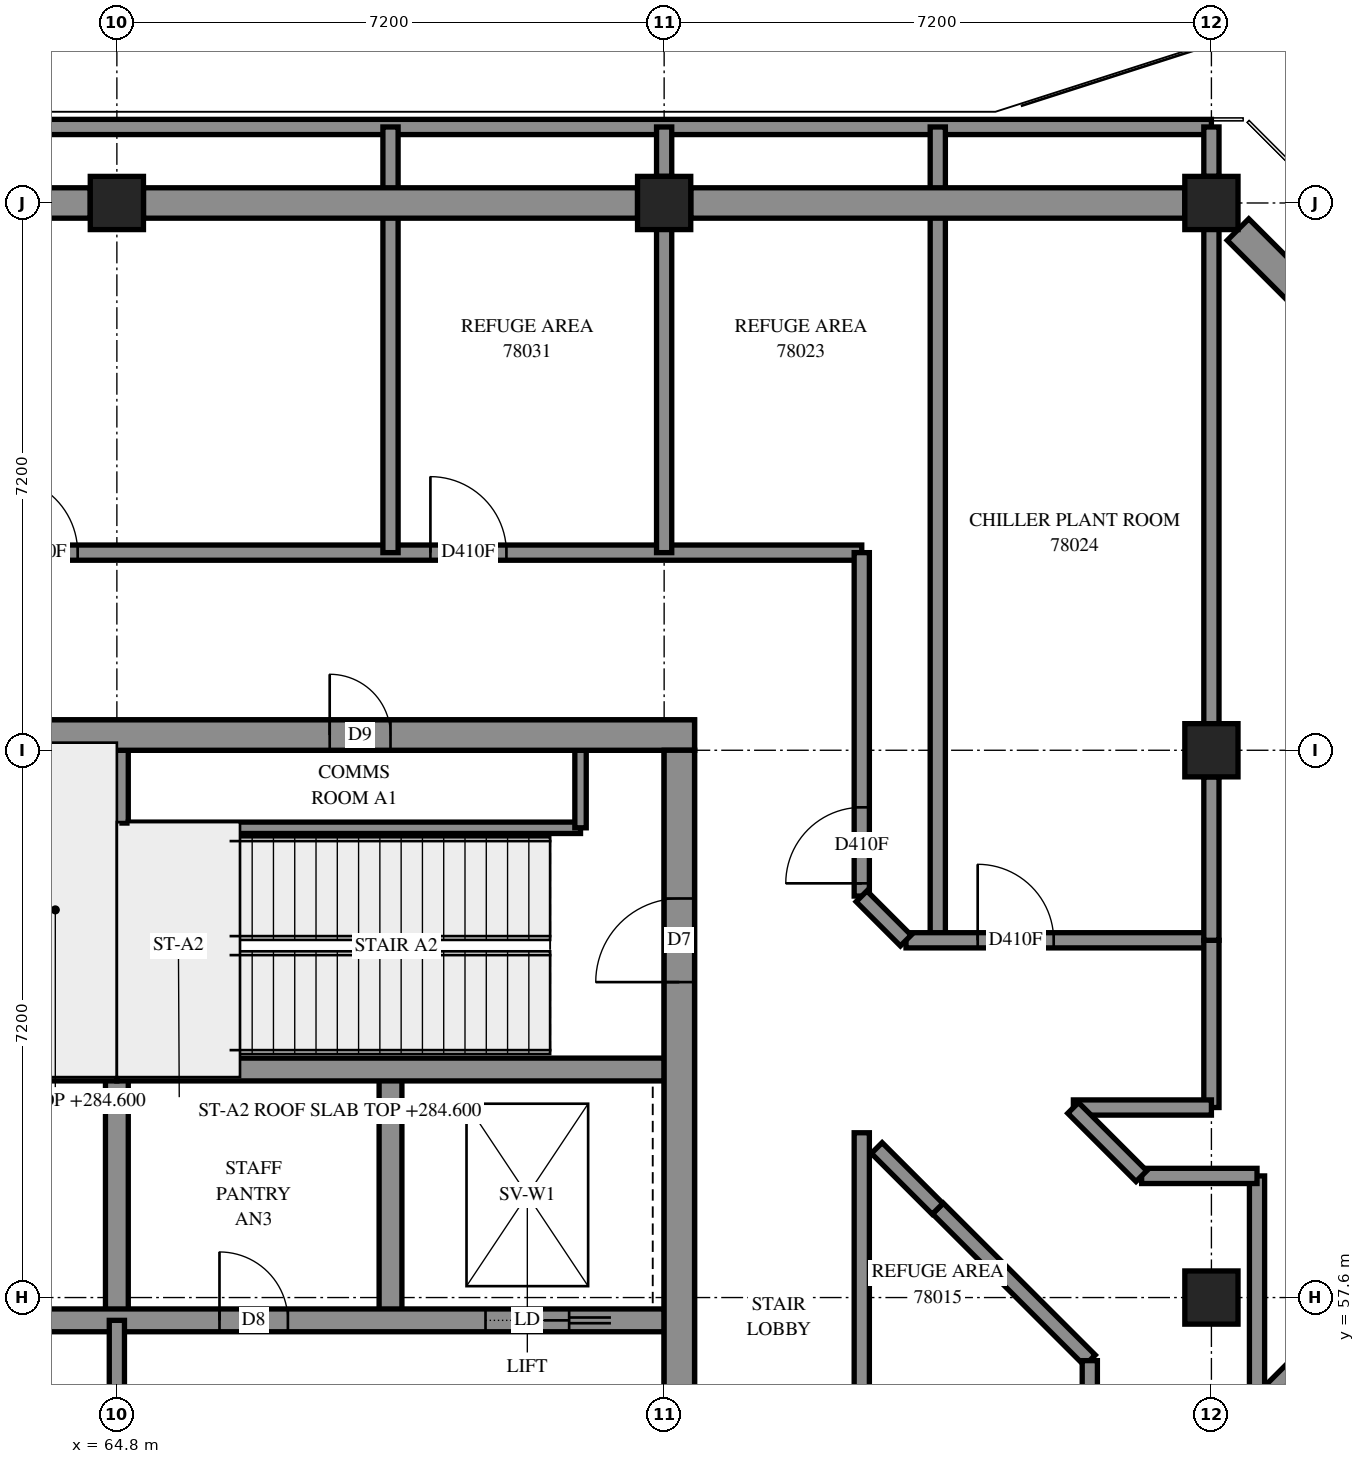
"""IFC4 building model, lengths in metres.
Left out: names, types, materials, properties, quantities, classifications, styles, units other than length and angle.
Written with IfcOpenShell. Run it as: python <this file> out.ifc"""

import sys

from ifc_helpers import new_model, si_unit, direction, frame, frame_2d, origin, origin_2d, place, context, subcontext, project, spatial, rectangle, extrude, element, fill, save


model = new_model("IFC4")
c1 = context("Model", 3, precision=1e-05, world=origin(), true_north=direction((0.0, 1.0)))
c2 = subcontext(c1, "Body", "Model", "MODEL_VIEW")
j1 = project(units=[si_unit("LENGTHUNIT", "METRE"), si_unit("PLANEANGLEUNIT", "RADIAN")], contexts=[c1])
p1 = place(None, origin())
s1 = spatial("IfcSite", under=j1, at=p1, CompositionType="ELEMENT")
p2 = place(p1, origin())
s2 = spatial("IfcBuilding", under=s1, at=p2, CompositionType="ELEMENT")
p3 = place(p2, frame((0.0, 0.0, 284.6)))
s3 = spatial("IfcBuildingStorey", under=s2, at=p3, CompositionType="ELEMENT", Elevation=284.6)
for number, where, z_axis, x_axis in (
    (1, (64.8, 72.0, 0.0), (0.0, 0.0, 1.0), (1.0, 0.0, 0.0)),
    (2, (72.0, 72.0, 0.0), (0.0, 0.0, 1.0), (1.0, 0.0, 0.0)),
    (3, (79.2, 57.6, 0.0), (0.0, 0.0, 1.0), (1.0, 0.0, 0.0)),
    (4, (79.2, 64.8, 0.0), (0.0, 0.0, 1.0), (1.0, 0.0, 0.0)),
    (5, (79.2, 72.0, 0.0), (0.0, 0.0, 1.0), (1.0, 0.0, 0.0)),
):
    element("IfcColumn", number, at=place(p3, frame(where, z_axis=z_axis, x_axis=x_axis)), inside=s3, PredefinedType="COLUMN", context=c2, shape_type="SweptSolid", body=[
        extrude(rectangle(XDim=0.7, YDim=0.7, at=origin_2d()), origin(), (0.0, 0.0, 1.0), 5.7),
    ])
p4 = place(p3, frame((57.2, 65.0, -0.3), z_axis=(0.0, 0.0, 1.0), x_axis=(1.0, 0.0, 0.0)))
e6 = element("IfcWall", 6, at=p4, inside=s3, PredefinedType="SHEAR", context=c2, shape_type="SweptSolid", body=[
    extrude(rectangle(XDim=15.2, YDim=0.4, at=frame_2d((7.6, 0.0))), origin(), (0.0, 0.0, 1.0), 5.3),
])
p5 = place(p4, frame((10.4, 0.0, 0.3)))
e7 = element("IfcOpeningElement", 7, at=p5, cuts=e6, PredefinedType="OPENING", context=c2, shape_type="SweptSolid", body=[
    extrude(rectangle(XDim=0.8, YDim=2.1, at=frame_2d((0.4, 1.05))), frame((0.0, 0.21, 0.0), z_axis=(0.0, -1.0, 0.0), x_axis=(1.0, 0.0, 0.0)), (0.0, 0.0, 1.0), 0.42),
])
p6 = place(p3, frame((72.2, 50.4, -0.3), z_axis=(0.0, 0.0, 1.0), x_axis=(0.0, 1.0, 0.0)))
e8 = element("IfcWall", 8, at=p6, inside=s3, PredefinedType="SHEAR", context=c2, shape_type="SweptSolid", body=[
    extrude(rectangle(XDim=14.4, YDim=0.4, at=frame_2d((7.2, 0.0))), origin(), (0.0, 0.0, 1.0), 5.3),
])
p7 = place(p6, frame((4.55, 0.0, 0.3)))
e9 = element("IfcOpeningElement", 9, at=p7, cuts=e8, PredefinedType="OPENING", context=c2, shape_type="SweptSolid", body=[
    extrude(rectangle(XDim=1.1, YDim=2.1, at=frame_2d((0.55, 1.05))), frame((0.0, 0.21, 0.0), z_axis=(0.0, -1.0, 0.0), x_axis=(1.0, 0.0, 0.0)), (0.0, 0.0, 1.0), 0.42),
])
p8 = place(p6, frame((11.35, 0.0, 0.3)))
e10 = element("IfcOpeningElement", 10, at=p8, cuts=e8, PredefinedType="OPENING", context=c2, shape_type="SweptSolid", body=[
    extrude(rectangle(XDim=1.1, YDim=2.1, at=frame_2d((0.55, 1.05))), frame((0.0, 0.21, 0.0), z_axis=(0.0, -1.0, 0.0), x_axis=(1.0, 0.0, 0.0)), (0.0, 0.0, 1.0), 0.42),
])
for number, where, z_axis, x_axis in (
    (11, (64.8, 57.3, 0.0), (0.0, 0.0, 1.0), (0.0, 1.0, 0.0)),
    (12, (68.4, 57.3, 0.0), (0.0, 0.0, 1.0), (0.0, 1.0, 0.0)),
):
    element("IfcWall", number, at=place(p3, frame(where, z_axis=z_axis, x_axis=x_axis)), inside=s3, PredefinedType="SOLIDWALL", context=c2, shape_type="SweptSolid", body=[
        extrude(rectangle(XDim=3.3, YDim=0.3, at=frame_2d((1.65, 0.0))), origin(), (0.0, 0.0, 1.0), 5.7),
    ])
p9 = place(p3, frame((57.6, 57.3, 0.0), z_axis=(0.0, 0.0, 1.0), x_axis=(1.0, 0.0, 0.0)))
e13 = element("IfcWall", 13, at=p9, inside=s3, PredefinedType="SOLIDWALL", context=c2, shape_type="SweptSolid", body=[
    extrude(rectangle(XDim=14.4, YDim=0.3, at=frame_2d((7.2, 0.0))), origin(), (0.0, 0.0, 1.0), 5.7),
])
p10 = place(p9, frame((8.55, 0.0, 0.0)))
e14 = element("IfcOpeningElement", 14, at=p10, cuts=e13, PredefinedType="OPENING", context=c2, shape_type="SweptSolid", body=[
    extrude(rectangle(XDim=0.9, YDim=2.1, at=frame_2d((0.45, 1.05))), frame((0.0, 0.16, 0.0), z_axis=(0.0, -1.0, 0.0), x_axis=(1.0, 0.0, 0.0)), (0.0, 0.0, 1.0), 0.32),
])
p11 = place(p9, frame((12.05, 0.0, 0.0)))
e15 = element("IfcOpeningElement", 15, at=p11, cuts=e13, PredefinedType="OPENING", context=c2, shape_type="SweptSolid", body=[
    extrude(rectangle(XDim=1.1, YDim=2.1, at=frame_2d((0.55, 1.05))), frame((0.0, 0.16, 0.0), z_axis=(0.0, -1.0, 0.0), x_axis=(1.0, 0.0, 0.0)), (0.0, 0.0, 1.0), 0.32),
])
for number, where, z_axis, x_axis in (
    (16, (57.6, 60.6, 0.0), (0.0, 0.0, 1.0), (1.0, 0.0, 0.0)),
    (17, (64.8, 60.6, 0.0), (0.0, 0.0, 1.0), (1.0, 0.0, 0.0)),
):
    element("IfcWall", number, at=place(p3, frame(where, z_axis=z_axis, x_axis=x_axis)), inside=s3, PredefinedType="SOLIDWALL", context=c2, shape_type="SweptSolid", body=[
        extrude(rectangle(XDim=7.2, YDim=0.3, at=frame_2d((3.6, 0.0))), origin(), (0.0, 0.0, 1.0), 5.7),
    ])
p12 = place(p3, frame((64.8, 60.6, 0.0), z_axis=(0.0, 0.0, 1.0), x_axis=(0.0, 1.0, 0.0)))
e18 = element("IfcWall", 18, at=p12, inside=s3, PredefinedType="SOLIDWALL", context=c2, shape_type="SweptSolid", body=[
    extrude(rectangle(XDim=4.2, YDim=0.3, at=frame_2d((2.1, 0.0))), origin(), (0.0, 0.0, 1.0), 5.7),
])
p13 = place(p3, frame((76.513, 49.231, -0.3), z_axis=(0.0, 0.0, 1.0), x_axis=(0.7071067812, 0.7071067812, 0.0)))
e19 = element("IfcWall", 19, at=p13, inside=s3, PredefinedType="SHEAR", context=c2, shape_type="SweptSolid", body=[
    extrude(rectangle(XDim=14.4, YDim=0.4, at=frame_2d((7.2, 0.0))), origin(), (0.0, 0.0, 1.0), 5.3),
])
p14 = place(p13, frame((4.55, 0.0, 0.3)))
e20 = element("IfcOpeningElement", 20, at=p14, cuts=e19, PredefinedType="OPENING", context=c2, shape_type="SweptSolid", body=[
    extrude(rectangle(XDim=1.1, YDim=2.1, at=frame_2d((0.55, 1.05))), frame((0.0, 0.21, 0.0), z_axis=(0.0, -1.0, 0.0), x_axis=(1.0, 0.0, 0.0)), (0.0, 0.0, 1.0), 0.42),
])
p15 = place(p13, frame((11.35, 0.0, 0.3)))
e21 = element("IfcOpeningElement", 21, at=p15, cuts=e19, PredefinedType="OPENING", context=c2, shape_type="SweptSolid", body=[
    extrude(rectangle(XDim=1.1, YDim=2.1, at=frame_2d((0.55, 1.05))), frame((0.0, 0.21, 0.0), z_axis=(0.0, -1.0, 0.0), x_axis=(1.0, 0.0, 0.0)), (0.0, 0.0, 1.0), 0.42),
])
p16 = place(p3, frame((64.95, 63.78, 0.0), z_axis=(0.0, 0.0, 1.0), x_axis=(1.0, 0.0, 0.0)))
e22 = element("IfcWall", 22, at=p16, inside=s3, PredefinedType="PARTITIONING", context=c2, shape_type="SweptSolid", body=[
    extrude(rectangle(XDim=5.95, YDim=0.15, at=frame_2d((2.975, 0.0))), origin(), (0.0, 0.0, 1.0), 5.7),
])
p17 = place(p3, frame((70.9, 63.78, 0.0), z_axis=(0.0, 0.0, 1.0), x_axis=(0.0, 1.0, 0.0)))
e23 = element("IfcWall", 23, at=p17, inside=s3, PredefinedType="PARTITIONING", context=c2, shape_type="SweptSolid", body=[
    extrude(rectangle(XDim=1.02, YDim=0.15, at=frame_2d((0.51, 0.0))), origin(), (0.0, 0.0, 1.0), 5.7),
])
p18 = place(p3, frame((64.8, 53.7, 0.0), z_axis=(0.0, 0.0, 1.0), x_axis=(0.0, 1.0, 0.0)))
e24 = element("IfcWall", 24, at=p18, inside=s3, PredefinedType="PARTITIONING", context=c2, shape_type="SweptSolid", body=[
    extrude(rectangle(XDim=3.6, YDim=0.2, at=frame_2d((1.8, 0.0))), origin(), (0.0, 0.0, 1.0), 5.7),
])
p19 = place(p18, frame((1.25, 0.0, 0.0)))
e25 = element("IfcOpeningElement", 25, at=p19, cuts=e24, PredefinedType="OPENING", context=c2, shape_type="SweptSolid", body=[
    extrude(rectangle(XDim=1.1, YDim=2.1, at=frame_2d((0.55, 1.05))), frame((0.0, 0.11, 0.0), z_axis=(0.0, -1.0, 0.0), x_axis=(1.0, 0.0, 0.0)), (0.0, 0.0, 1.0), 0.22),
])
p20 = place(p3, frame((27.73, 73.0, 0.0), z_axis=(0.0, 0.0, 1.0), x_axis=(1.0, 0.0, 0.0)))
e26 = element("IfcWall", 26, at=p20, inside=s3, PredefinedType="PARTITIONING", context=c2, shape_type="SweptSolid", body=[
    extrude(rectangle(XDim=51.47, YDim=0.2, at=frame_2d((25.735, 0.0))), origin(), (0.0, 0.0, 1.0), 5.2),
])
p21 = place(p3, frame((55.002, 67.4, 0.0), z_axis=(0.0, 0.0, 1.0), x_axis=(1.0, 0.0, 0.0)))
e27 = element("IfcWall", 27, at=p21, inside=s3, PredefinedType="PARTITIONING", context=c2, shape_type="SweptSolid", body=[
    extrude(rectangle(XDim=19.598, YDim=0.2, at=frame_2d((9.799, 0.0))), origin(), (0.0, 0.0, 1.0), 5.7),
])
p22 = place(p21, frame((8.282, 0.0, 0.0)))
e28 = element("IfcOpeningElement", 28, at=p22, cuts=e27, PredefinedType="OPENING", context=c2, shape_type="SweptSolid", body=[
    extrude(rectangle(XDim=1.0, YDim=2.1, at=frame_2d((0.5, 1.05))), frame((0.0, 0.11, 0.0), z_axis=(0.0, -1.0, 0.0), x_axis=(1.0, 0.0, 0.0)), (0.0, 0.0, 1.0), 0.22),
])
p23 = place(p21, frame((13.923, 0.0, 0.0)))
e29 = element("IfcOpeningElement", 29, at=p23, cuts=e27, PredefinedType="OPENING", context=c2, shape_type="SweptSolid", body=[
    extrude(rectangle(XDim=1.0, YDim=2.1, at=frame_2d((0.5, 1.05))), frame((0.0, 0.11, 0.0), z_axis=(0.0, -1.0, 0.0), x_axis=(1.0, 0.0, 0.0)), (0.0, 0.0, 1.0), 0.22),
])
p24 = place(p3, frame((75.6, 62.3, 0.0), z_axis=(0.0, 0.0, 1.0), x_axis=(0.0, 1.0, 0.0)))
e30 = element("IfcWall", 30, at=p24, inside=s3, PredefinedType="PARTITIONING", context=c2, shape_type="SweptSolid", body=[
    extrude(rectangle(XDim=10.7, YDim=0.2, at=frame_2d((5.35, 0.0))), origin(), (0.0, 0.0, 1.0), 5.7),
])
p25 = place(p3, frame((79.2, 64.45, 0.0), z_axis=(0.0, 0.0, 1.0), x_axis=(0.0, 1.0, 0.0)))
e31 = element("IfcWall", 31, at=p25, inside=s3, PredefinedType="PARTITIONING", context=c2, shape_type="SweptSolid", body=[
    extrude(rectangle(XDim=7.9, YDim=0.2, at=frame_2d((3.95, 0.0))), origin(), (0.0, 0.0, 1.0), 5.7),
])
p26 = place(p3, frame((68.4, 67.4, 0.0), z_axis=(0.0, 0.0, 1.0), x_axis=(0.0, 1.0, 0.0)))
e32 = element("IfcWall", 32, at=p26, inside=s3, PredefinedType="PARTITIONING", context=c2, shape_type="SweptSolid", body=[
    extrude(rectangle(XDim=5.6, YDim=0.2, at=frame_2d((2.8, 0.0))), origin(), (0.0, 0.0, 1.0), 5.7),
])
p27 = place(p3, frame((74.6, 55.102, 0.0), z_axis=(0.0, 0.0, 1.0), x_axis=(0.0, 1.0, 0.0)))
e33 = element("IfcWall", 33, at=p27, inside=s3, PredefinedType="PARTITIONING", context=c2, shape_type="SweptSolid", body=[
    extrude(rectangle(XDim=4.666, YDim=0.2, at=frame_2d((2.333, 0.0))), origin(), (0.0, 0.0, 1.0), 5.7),
])
p28 = place(p3, frame((74.6, 62.882, 0.0), z_axis=(0.0, 0.0, 1.0), x_axis=(0.0, 1.0, 0.0)))
e34 = element("IfcWall", 34, at=p28, inside=s3, PredefinedType="PARTITIONING", context=c2, shape_type="SweptSolid", body=[
    extrude(rectangle(XDim=4.518, YDim=0.2, at=frame_2d((2.259, 0.0))), origin(), (0.0, 0.0, 1.0), 5.7),
])
p29 = place(p28, frame((0.167, 0.0, 0.0)))
e35 = element("IfcOpeningElement", 35, at=p29, cuts=e34, PredefinedType="OPENING", context=c2, shape_type="SweptSolid", body=[
    extrude(rectangle(XDim=1.0, YDim=2.1, at=frame_2d((0.5, 1.05))), frame((0.0, 0.11, 0.0), z_axis=(0.0, -1.0, 0.0), x_axis=(1.0, 0.0, 0.0)), (0.0, 0.0, 1.0), 0.22),
])
p30 = place(p3, frame((72.0, 67.4, 0.0), z_axis=(0.0, 0.0, 1.0), x_axis=(0.0, 1.0, 0.0)))
e36 = element("IfcWall", 36, at=p30, inside=s3, PredefinedType="PARTITIONING", context=c2, shape_type="SweptSolid", body=[
    extrude(rectangle(XDim=4.95, YDim=0.2, at=frame_2d((2.475, 0.0))), origin(), (0.0, 0.0, 1.0), 5.7),
])
p31 = place(p3, frame((75.182, 62.3, 0.0), z_axis=(0.0, 0.0, 1.0), x_axis=(1.0, 0.0, 0.0)))
e37 = element("IfcWall", 37, at=p31, inside=s3, PredefinedType="PARTITIONING", context=c2, shape_type="SweptSolid", body=[
    extrude(rectangle(XDim=4.018, YDim=0.2, at=frame_2d((2.009, 0.0))), origin(), (0.0, 0.0, 1.0), 5.7),
])
p32 = place(p31, frame((0.943, 0.0, 0.0)))
e38 = element("IfcOpeningElement", 38, at=p32, cuts=e37, PredefinedType="OPENING", context=c2, shape_type="SweptSolid", body=[
    extrude(rectangle(XDim=1.0, YDim=2.1, at=frame_2d((0.5, 1.05))), frame((0.0, 0.11, 0.0), z_axis=(0.0, -1.0, 0.0), x_axis=(1.0, 0.0, 0.0)), (0.0, 0.0, 1.0), 0.22),
])
p33 = place(p3, frame((79.8, 56.198, 0.0), z_axis=(0.0, 0.0, 1.0), x_axis=(0.0, 1.0, 0.0)))
e39 = element("IfcWall", 39, at=p33, inside=s3, PredefinedType="PARTITIONING", context=c2, shape_type="SweptSolid", body=[
    extrude(rectangle(XDim=3.002, YDim=0.2, at=frame_2d((1.501, 0.0))), origin(), (0.0, 0.0, 1.0), 5.7),
])
p34 = place(p3, frame((75.601, 58.771, 0.0), z_axis=(0.0, 0.0, 1.0), x_axis=(0.7074604229, -0.7067529625, 0.0)))
e40 = element("IfcWall", 40, at=p34, inside=s3, PredefinedType="PARTITIONING", context=c2, shape_type="SweptSolid", body=[
    extrude(rectangle(XDim=2.827, YDim=0.2, at=frame_2d((1.413, 0.0))), origin(), (0.0, 0.0, 1.0), 5.7),
])
p35 = place(p3, frame((79.2, 60.1, 0.0), z_axis=(0.0, 0.0, 1.0), x_axis=(0.0, 1.0, 0.0)))
e41 = element("IfcWall", 41, at=p35, inside=s3, PredefinedType="PARTITIONING", context=c2, shape_type="SweptSolid", body=[
    extrude(rectangle(XDim=2.2, YDim=0.2, at=frame_2d((1.1, 0.0))), origin(), (0.0, 0.0, 1.0), 5.7),
])
p36 = place(p3, frame((79.2, 62.3, 0.0), z_axis=(0.0, 0.0, 1.0), x_axis=(0.0, 1.0, 0.0)))
e42 = element("IfcWall", 42, at=p36, inside=s3, PredefinedType="PARTITIONING", context=c2, shape_type="SweptSolid", body=[
    extrude(rectangle(XDim=2.15, YDim=0.2, at=frame_2d((1.075, 0.0))), origin(), (0.0, 0.0, 1.0), 5.7),
])
p37 = place(p3, frame((77.384, 60.1, 0.0), z_axis=(0.0, 0.0, 1.0), x_axis=(1.0, 0.0, 0.0)))
e43 = element("IfcWall", 43, at=p37, inside=s3, PredefinedType="PARTITIONING", context=c2, shape_type="SweptSolid", body=[
    extrude(rectangle(XDim=1.816, YDim=0.2, at=frame_2d((0.908, 0.0))), origin(), (0.0, 0.0, 1.0), 5.7),
])
p38 = place(p3, frame((78.282, 59.2, 0.0), z_axis=(0.0, 0.0, 1.0), x_axis=(1.0, 0.0, 0.0)))
e44 = element("IfcWall", 44, at=p38, inside=s3, PredefinedType="PARTITIONING", context=c2, shape_type="SweptSolid", body=[
    extrude(rectangle(XDim=1.518, YDim=0.2, at=frame_2d((0.759, 0.0))), origin(), (0.0, 0.0, 1.0), 5.7),
])
p39 = place(p3, frame((79.803, 56.195, 0.0), z_axis=(0.0, 0.0, 1.0), x_axis=(0.7063986127, 0.7078142412, 0.0)))
e45 = element("IfcWall", 45, at=p39, inside=s3, PredefinedType="PARTITIONING", context=c2, shape_type="SweptSolid", body=[
    extrude(rectangle(XDim=1.413, YDim=0.2, at=frame_2d((0.706, 0.0))), origin(), (0.0, 0.0, 1.0), 5.7),
])
p40 = place(p3, frame((77.381, 60.095, 0.0), z_axis=(0.0, 0.0, 1.0), x_axis=(0.7071067812, -0.7071067812, 0.0)))
e46 = element("IfcWall", 46, at=p40, inside=s3, PredefinedType="PARTITIONING", context=c2, shape_type="SweptSolid", body=[
    extrude(rectangle(XDim=1.27, YDim=0.2, at=frame_2d((0.635, 0.0))), origin(), (0.0, 0.0, 1.0), 5.7),
])
p41 = place(p3, frame((74.797, 59.567, 0.0), z_axis=(0.0, 0.0, 1.0), x_axis=(0.7071067812, -0.7071067812, 0.0)))
e47 = element("IfcWall", 47, at=p41, inside=s3, PredefinedType="PARTITIONING", context=c2, shape_type="SweptSolid", body=[
    extrude(rectangle(XDim=1.131, YDim=0.2, at=frame_2d((0.566, 0.0))), origin(), (0.0, 0.0, 1.0), 5.7),
])
p42 = place(p3, frame((74.597, 62.879, 0.0), z_axis=(0.0, 0.0, 1.0), x_axis=(0.7071067812, -0.7071067812, 0.0)))
e48 = element("IfcWall", 48, at=p42, inside=s3, PredefinedType="PARTITIONING", context=c2, shape_type="SweptSolid", body=[
    extrude(rectangle(XDim=0.823, YDim=0.2, at=frame_2d((0.412, 0.0))), origin(), (0.0, 0.0, 1.0), 5.7),
])
p43 = place(p3, frame((77.6, 56.002, 0.0), z_axis=(0.0, 0.0, 1.0), x_axis=(0.0, 1.0, 0.0)))
e49 = element("IfcWall", 49, at=p43, inside=s3, PredefinedType="PARTITIONING", context=c2, shape_type="SweptSolid", body=[
    extrude(rectangle(XDim=0.768, YDim=0.2, at=frame_2d((0.384, 0.0))), origin(), (0.0, 0.0, 1.0), 5.7),
])
for number, where, z_axis, x_axis in (
    (50, (72.0, 72.35, 0.0), (0.0, 0.0, 1.0), (0.0, 1.0, 0.0)),
    (51, (79.2, 72.35, 0.0), (0.0, 0.0, 1.0), (0.0, 1.0, 0.0)),
):
    element("IfcWall", number, at=place(p3, frame(where, z_axis=z_axis, x_axis=x_axis)), inside=s3, PredefinedType="PARTITIONING", context=c2, shape_type="SweptSolid", body=[
        extrude(rectangle(XDim=0.65, YDim=0.2, at=frame_2d((0.325, 0.0))), origin(), (0.0, 0.0, 1.0), 5.7),
    ])
p44 = place(p5, origin())
e52 = element("IfcDoor", 52, at=p44, inside=s3, OperationType="SINGLE_SWING_RIGHT", PredefinedType="DOOR", context=c2, shape_type="SweptSolid", body=[
    extrude(rectangle(XDim=0.8, YDim=2.1, at=frame_2d((0.4, 1.05))), frame((0.0, 0.025, 0.0), z_axis=(0.0, -1.0, 0.0), x_axis=(1.0, 0.0, 0.0)), (0.0, 0.0, 1.0), 0.05),
])
fill(e7, e52)
p45 = place(p8, origin())
e53 = element("IfcDoor", 53, at=p45, inside=s3, OperationType="SINGLE_SWING_RIGHT", PredefinedType="DOOR", context=c2, shape_type="SweptSolid", body=[
    extrude(rectangle(XDim=1.1, YDim=2.1, at=frame_2d((0.55, 1.05))), frame((0.0, 0.025, 0.0), z_axis=(0.0, -1.0, 0.0), x_axis=(1.0, 0.0, 0.0)), (0.0, 0.0, 1.0), 0.05),
])
fill(e10, e53)
p46 = place(p10, origin())
e54 = element("IfcDoor", 54, at=p46, inside=s3, OperationType="SINGLE_SWING_LEFT", PredefinedType="DOOR", context=c2, shape_type="SweptSolid", body=[
    extrude(rectangle(XDim=0.9, YDim=2.1, at=frame_2d((0.45, 1.05))), frame((0.0, 0.025, 0.0), z_axis=(0.0, -1.0, 0.0), x_axis=(1.0, 0.0, 0.0)), (0.0, 0.0, 1.0), 0.05),
])
fill(e14, e54)
p47 = place(p11, origin())
e55 = element("IfcDoor", 55, at=p47, inside=s3, OperationType="SLIDING_TO_RIGHT", PredefinedType="DOOR", context=c2, shape_type="SweptSolid", body=[
    extrude(rectangle(XDim=1.1, YDim=2.1, at=frame_2d((0.55, 1.05))), frame((0.0, 0.025, 0.0), z_axis=(0.0, -1.0, 0.0), x_axis=(1.0, 0.0, 0.0)), (0.0, 0.0, 1.0), 0.05),
])
fill(e15, e55)
p48 = place(p29, origin())
e56 = element("IfcDoor", 56, at=p48, inside=s3, OperationType="SINGLE_SWING_RIGHT", PredefinedType="DOOR", context=c2, shape_type="SweptSolid", body=[
    extrude(rectangle(XDim=1.0, YDim=2.1, at=frame_2d((0.5, 1.05))), frame((0.0, 0.025, 0.0), z_axis=(0.0, -1.0, 0.0), x_axis=(1.0, 0.0, 0.0)), (0.0, 0.0, 1.0), 0.05),
])
fill(e35, e56)
p49 = place(p32, origin())
e57 = element("IfcDoor", 57, at=p49, inside=s3, OperationType="SINGLE_SWING_LEFT", PredefinedType="DOOR", context=c2, shape_type="SweptSolid", body=[
    extrude(rectangle(XDim=1.0, YDim=2.1, at=frame_2d((0.5, 1.05))), frame((0.0, 0.025, 0.0), z_axis=(0.0, -1.0, 0.0), x_axis=(1.0, 0.0, 0.0)), (0.0, 0.0, 1.0), 0.05),
])
fill(e38, e57)
p50 = place(p22, origin())
e58 = element("IfcDoor", 58, at=p50, inside=s3, OperationType="SINGLE_SWING_RIGHT", PredefinedType="DOOR", context=c2, shape_type="SweptSolid", body=[
    extrude(rectangle(XDim=1.0, YDim=2.1, at=frame_2d((0.5, 1.05))), frame((0.0, 0.025, 0.0), z_axis=(0.0, -1.0, 0.0), x_axis=(1.0, 0.0, 0.0)), (0.0, 0.0, 1.0), 0.05),
])
fill(e28, e58)
p51 = place(p23, origin())
e59 = element("IfcDoor", 59, at=p51, inside=s3, OperationType="SINGLE_SWING_LEFT", PredefinedType="DOOR", context=c2, shape_type="SweptSolid", body=[
    extrude(rectangle(XDim=1.0, YDim=2.1, at=frame_2d((0.5, 1.05))), frame((0.0, 0.025, 0.0), z_axis=(0.0, -1.0, 0.0), x_axis=(1.0, 0.0, 0.0)), (0.0, 0.0, 1.0), 0.05),
])
fill(e29, e59)
save(model, sys.argv[1])
